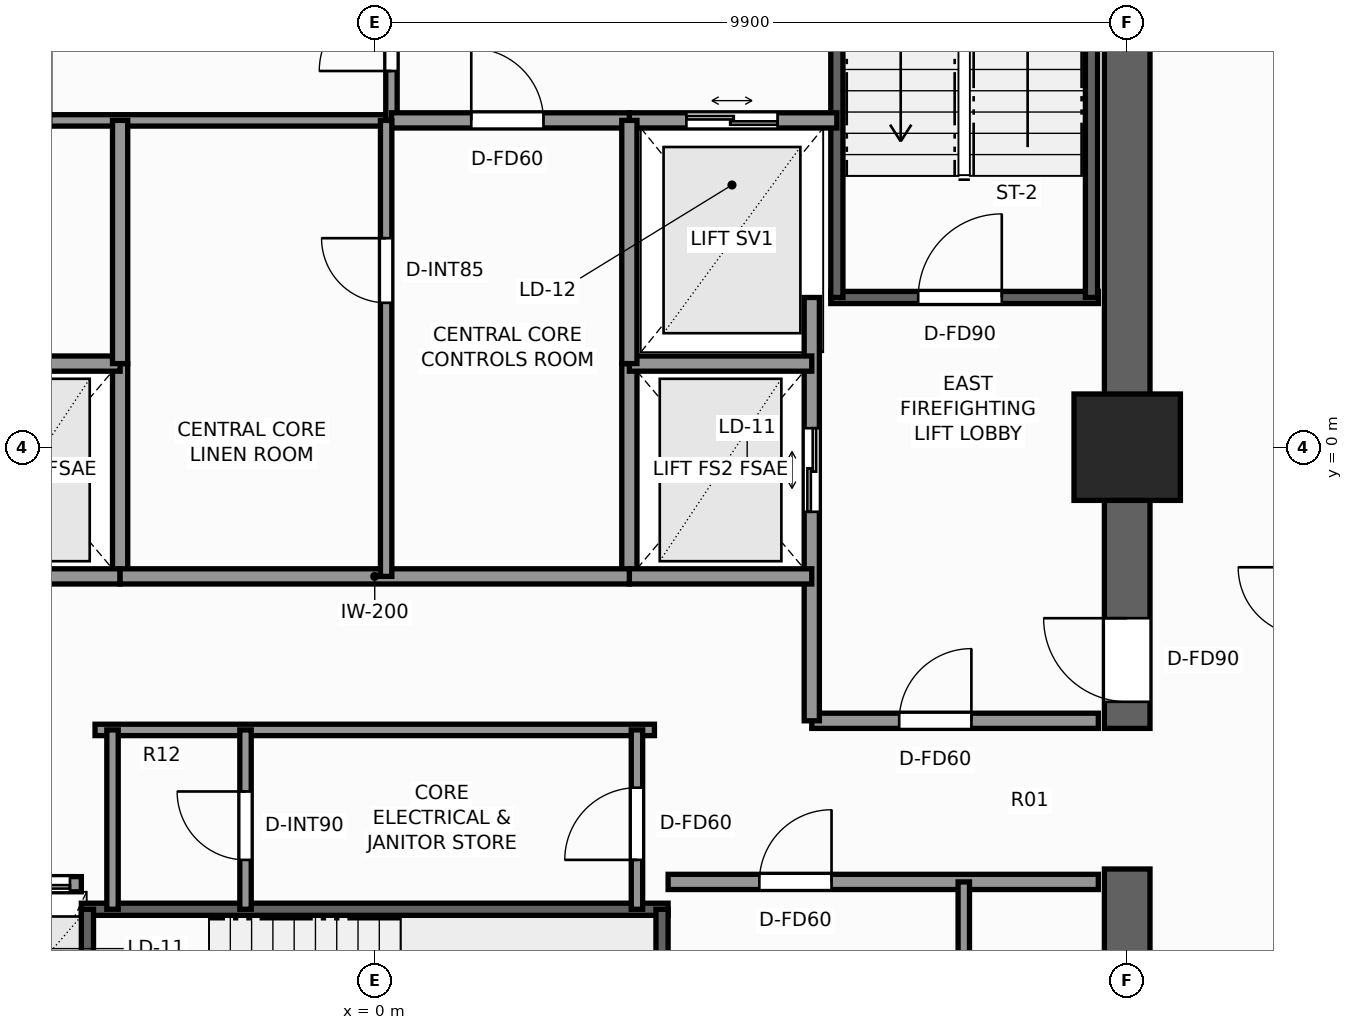
"""IFC4 building model, lengths in metres.
Left out: names, types, materials, properties, quantities, classifications, styles, units other than length and angle.
Written with IfcOpenShell. Run it as: python <this file> out.ifc"""

import sys

from ifc_helpers import new_model, si_unit, direction, frame, frame_2d, origin, origin_2d, place, context, subcontext, project, spatial, rectangle, extrude, element, fill, save


model = new_model("IFC4")
c1 = context("Model", 3, precision=1e-05, world=origin(), true_north=direction((0.0, 1.0)))
c2 = subcontext(c1, "Body", "Model", "MODEL_VIEW")
j1 = project(units=[si_unit("LENGTHUNIT", "METRE"), si_unit("PLANEANGLEUNIT", "RADIAN")], contexts=[c1])
p1 = place(None, origin())
s1 = spatial("IfcSite", under=j1, at=p1, CompositionType="ELEMENT")
p2 = place(p1, origin())
s2 = spatial("IfcBuilding", under=s1, at=p2, CompositionType="ELEMENT")
p3 = place(p2, frame((0.0, 0.0, 101.9)))
s3 = spatial("IfcBuildingStorey", under=s2, at=p3, CompositionType="ELEMENT", Elevation=101.9)
p4 = place(p3, frame((9.9, -9.6, 0.0), z_axis=(0.0, 0.0, 1.0), x_axis=(0.0, 1.0, 0.0)))
e1 = element("IfcWall", 1, at=p4, inside=s3, PredefinedType="SHEAR", context=c2, shape_type="SweptSolid", body=[
    extrude(rectangle(XDim=4.05, YDim=0.6, at=frame_2d((2.025, 0.0))), origin(), (0.0, 0.0, 1.0), 3.3),
])
p5 = place(p3, frame((9.9, -3.7, 0.0), z_axis=(0.0, 0.0, 1.0), x_axis=(0.0, 1.0, 0.0)))
e2 = element("IfcWall", 2, at=p5, inside=s3, PredefinedType="SHEAR", context=c2, shape_type="SweptSolid", body=[
    extrude(rectangle(XDim=13.3, YDim=0.6, at=frame_2d((6.65, 0.0))), origin(), (0.0, 0.0, 1.0), 3.3),
])
p6 = place(p5, frame((0.35, 0.0, 0.0)))
e3 = element("IfcOpeningElement", 3, at=p6, cuts=e2, PredefinedType="OPENING", context=c2, shape_type="SweptSolid", body=[
    extrude(rectangle(XDim=1.1, YDim=2.2, at=frame_2d((0.55, 1.1))), frame((0.0, 0.31, 0.0), z_axis=(0.0, -1.0, 0.0), x_axis=(1.0, 0.0, 0.0)), (0.0, 0.0, 1.0), 0.62),
])
p7 = place(p3, frame((9.9, 0.0, 0.0), z_axis=(0.0, 0.0, 1.0), x_axis=(1.0, 0.0, 0.0)))
e4 = element("IfcColumn", 4, at=p7, inside=s3, PredefinedType="COLUMN", context=c2, shape_type="SweptSolid", body=[
    extrude(rectangle(XDim=1.4, YDim=1.4, at=origin_2d()), origin(), (0.0, 0.0, 1.0), 3.3),
])
p8 = place(p3, frame((6.0, 1.97, 0.0), z_axis=(0.0, 0.0, 1.0), x_axis=(1.0, 0.0, 0.0)))
e5 = element("IfcWall", 5, at=p8, inside=s3, PredefinedType="SHEAR", context=c2, shape_type="SweptSolid", body=[
    extrude(rectangle(XDim=3.52, YDim=0.16, at=frame_2d((1.76, 0.0))), origin(), (0.0, 0.0, 1.0), 3.3),
])
p9 = place(p8, frame((1.15, 0.0, 0.0)))
e6 = element("IfcOpeningElement", 6, at=p9, cuts=e5, PredefinedType="OPENING", context=c2, shape_type="SweptSolid", body=[
    extrude(rectangle(XDim=1.1, YDim=2.2, at=frame_2d((0.55, 1.1))), frame((0.0, 0.09, 0.0), z_axis=(0.0, -1.0, 0.0), x_axis=(1.0, 0.0, 0.0)), (0.0, 0.0, 1.0), 0.18),
])
for number, where, z_axis, x_axis in (
    (7, (6.08, 1.97, 0.0), (0.0, 0.0, 1.0), (0.0, 1.0, 0.0)),
    (8, (9.43, 1.97, 0.0), (0.0, 0.0, 1.0), (0.0, 1.0, 0.0)),
):
    element("IfcWall", number, at=place(p3, frame(where, z_axis=z_axis, x_axis=x_axis)), inside=s3, PredefinedType="SHEAR", context=c2, shape_type="SweptSolid", body=[
        extrude(rectangle(XDim=7.56, YDim=0.16, at=frame_2d((3.78, 0.0))), origin(), (0.0, 0.0, 1.0), 3.3),
    ])
p10 = place(p3, frame((-3.86, -6.08, 0.0), z_axis=(0.0, 0.0, 1.0), x_axis=(1.0, 0.0, 0.0)))
e9 = element("IfcWall", 9, at=p10, inside=s3, PredefinedType="SHEAR", context=c2, shape_type="SweptSolid", body=[
    extrude(rectangle(XDim=7.72, YDim=0.16, at=frame_2d((3.86, 0.0))), origin(), (0.0, 0.0, 1.0), 3.3),
])
for number, where, z_axis, x_axis in (
    (10, (-3.78, -9.43, 0.0), (0.0, 0.0, 1.0), (0.0, 1.0, 0.0)),
    (11, (3.78, -9.43, 0.0), (0.0, 0.0, 1.0), (0.0, 1.0, 0.0)),
):
    element("IfcWall", number, at=place(p3, frame(where, z_axis=z_axis, x_axis=x_axis)), inside=s3, PredefinedType="SHEAR", context=c2, shape_type="SweptSolid", body=[
        extrude(rectangle(XDim=3.35, YDim=0.16, at=frame_2d((1.675, 0.0))), origin(), (0.0, 0.0, 1.0), 3.3),
    ])
p11 = place(p3, frame((-3.35, -1.7, 0.0), z_axis=(0.0, 0.0, 1.0), x_axis=(0.0, 1.0, 0.0)))
e12 = element("IfcWall", 12, at=p11, inside=s3, PredefinedType="SOLIDWALL", context=c2, shape_type="SweptSolid", body=[
    extrude(rectangle(XDim=2.8, YDim=0.2, at=frame_2d((1.4, 0.0))), origin(), (0.0, 0.0, 1.0), 3.08),
])
for number, where, z_axis, x_axis in (
    (13, (-5.75, -1.7, 0.0), (0.0, 0.0, 1.0), (1.0, 0.0, 0.0)),
    (14, (-5.75, 1.1, 0.0), (0.0, 0.0, 1.0), (1.0, 0.0, 0.0)),
):
    element("IfcWall", number, at=place(p3, frame(where, z_axis=z_axis, x_axis=x_axis)), inside=s3, PredefinedType="SOLIDWALL", context=c2, shape_type="SweptSolid", body=[
        extrude(rectangle(XDim=2.4, YDim=0.2, at=frame_2d((1.2, 0.0))), origin(), (0.0, 0.0, 1.0), 3.08),
    ])
p12 = place(p3, frame((5.75, -3.6, 0.0), z_axis=(0.0, 0.0, 1.0), x_axis=(1.0, 0.0, 0.0)))
e15 = element("IfcWall", 15, at=p12, inside=s3, PredefinedType="SOLIDWALL", context=c2, shape_type="SweptSolid", body=[
    extrude(rectangle(XDim=3.77, YDim=0.2, at=frame_2d((1.885, 0.0))), origin(), (0.0, 0.0, 1.0), 3.08),
])
p13 = place(p12, frame((1.15, 0.0, 0.0)))
e16 = element("IfcOpeningElement", 16, at=p13, cuts=e15, PredefinedType="OPENING", context=c2, shape_type="SweptSolid", body=[
    extrude(rectangle(XDim=0.95, YDim=2.06, at=frame_2d((0.475, 1.03))), frame((0.0, 0.11, 0.0), z_axis=(0.0, -1.0, 0.0), x_axis=(1.0, 0.0, 0.0)), (0.0, 0.0, 1.0), 0.22),
])
p14 = place(p3, frame((5.75, -3.6, 0.0), z_axis=(0.0, 0.0, 1.0), x_axis=(0.0, 1.0, 0.0)))
e17 = element("IfcWall", 17, at=p14, inside=s3, PredefinedType="SOLIDWALL", context=c2, shape_type="SweptSolid", body=[
    extrude(rectangle(XDim=5.57, YDim=0.2, at=frame_2d((2.785, 0.0))), origin(), (0.0, 0.0, 1.0), 3.08),
])
p15 = place(p14, frame((2.75, 0.0, 0.0)))
e18 = element("IfcOpeningElement", 18, at=p15, cuts=e17, PredefinedType="OPENING", context=c2, shape_type="SweptSolid", body=[
    extrude(rectangle(XDim=1.1, YDim=2.2, at=frame_2d((0.55, 1.1))), frame((0.0, 0.11, 0.0), z_axis=(0.0, -1.0, 0.0), x_axis=(1.0, 0.0, 0.0)), (0.0, 0.0, 1.0), 0.22),
])
p16 = place(p3, frame((3.35, -1.7, 0.0), z_axis=(0.0, 0.0, 1.0), x_axis=(0.0, 1.0, 0.0)))
e19 = element("IfcWall", 19, at=p16, inside=s3, PredefinedType="SOLIDWALL", context=c2, shape_type="SweptSolid", body=[
    extrude(rectangle(XDim=2.8, YDim=0.2, at=frame_2d((1.4, 0.0))), origin(), (0.0, 0.0, 1.0), 3.08),
])
for number, where, z_axis, x_axis in (
    (20, (3.35, -1.7, 0.0), (0.0, 0.0, 1.0), (1.0, 0.0, 0.0)),
    (21, (3.35, 1.1, 0.0), (0.0, 0.0, 1.0), (1.0, 0.0, 0.0)),
):
    element("IfcWall", number, at=place(p3, frame(where, z_axis=z_axis, x_axis=x_axis)), inside=s3, PredefinedType="SOLIDWALL", context=c2, shape_type="SweptSolid", body=[
        extrude(rectangle(XDim=2.4, YDim=0.2, at=frame_2d((1.2, 0.0))), origin(), (0.0, 0.0, 1.0), 3.08),
    ])
p17 = place(p3, frame((3.35, 4.3, 0.0), z_axis=(0.0, 0.0, 1.0), x_axis=(1.0, 0.0, 0.0)))
e22 = element("IfcWall", 22, at=p17, inside=s3, PredefinedType="SOLIDWALL", context=c2, shape_type="SweptSolid", body=[
    extrude(rectangle(XDim=2.73, YDim=0.2, at=frame_2d((1.365, 0.0))), origin(), (0.0, 0.0, 1.0), 3.08),
])
p18 = place(p17, frame((0.75, 0.0, 0.0)))
e23 = element("IfcOpeningElement", 23, at=p18, cuts=e22, PredefinedType="OPENING", context=c2, shape_type="SweptSolid", body=[
    extrude(rectangle(XDim=1.2, YDim=2.25, at=frame_2d((0.6, 1.125))), frame((0.0, 0.11, 0.0), z_axis=(0.0, -1.0, 0.0), x_axis=(1.0, 0.0, 0.0)), (0.0, 0.0, 1.0), 0.22),
])
p19 = place(p3, frame((-6.08, 4.3, 0.0), z_axis=(0.0, 0.0, 1.0), x_axis=(1.0, 0.0, 0.0)))
e24 = element("IfcWall", 24, at=p19, inside=s3, PredefinedType="PARTITIONING", context=c2, shape_type="SweptSolid", body=[
    extrude(rectangle(XDim=6.3, YDim=0.15, at=frame_2d((3.15, 0.0))), origin(), (0.0, 0.0, 1.0), 3.08),
])
p20 = place(p19, frame((0.65, 0.0, 0.0)))
e25 = element("IfcOpeningElement", 25, at=p20, cuts=e24, PredefinedType="OPENING", context=c2, shape_type="SweptSolid", body=[
    extrude(rectangle(XDim=0.85, YDim=2.03, at=frame_2d((0.425, 1.015))), frame((0.0, 0.085, 0.0), z_axis=(0.0, -1.0, 0.0), x_axis=(1.0, 0.0, 0.0)), (0.0, 0.0, 1.0), 0.17),
])
p21 = place(p3, frame((0.22, 4.3, 0.0), z_axis=(0.0, 0.0, 1.0), x_axis=(0.0, 1.0, 0.0)))
e26 = element("IfcWall", 26, at=p21, inside=s3, PredefinedType="PARTITIONING", context=c2, shape_type="SweptSolid", body=[
    extrude(rectangle(XDim=5.22, YDim=0.15, at=frame_2d((2.61, 0.0))), origin(), (0.0, 0.0, 1.0), 3.08),
])
p22 = place(p21, frame((0.65, 0.0, 0.0)))
e27 = element("IfcOpeningElement", 27, at=p22, cuts=e26, PredefinedType="OPENING", context=c2, shape_type="SweptSolid", body=[
    extrude(rectangle(XDim=0.95, YDim=2.06, at=frame_2d((0.475, 1.03))), frame((0.0, 0.085, 0.0), z_axis=(0.0, -1.0, 0.0), x_axis=(1.0, 0.0, 0.0)), (0.0, 0.0, 1.0), 0.17),
])
p23 = place(p3, frame((-9.52, -5.75, 0.0), z_axis=(0.0, 0.0, 1.0), x_axis=(1.0, 0.0, 0.0)))
e28 = element("IfcWall", 28, at=p23, inside=s3, PredefinedType="SOLIDWALL", context=c2, shape_type="SweptSolid", body=[
    extrude(rectangle(XDim=5.66, YDim=0.2, at=frame_2d((2.83, 0.0))), origin(), (0.0, 0.0, 1.0), 3.08),
])
p24 = place(p23, frame((0.55, 0.0, 0.0)))
e29 = element("IfcOpeningElement", 29, at=p24, cuts=e28, PredefinedType="OPENING", context=c2, shape_type="SweptSolid", body=[
    extrude(rectangle(XDim=1.1, YDim=2.2, at=frame_2d((0.55, 1.1))), frame((0.0, 0.11, 0.0), z_axis=(0.0, -1.0, 0.0), x_axis=(1.0, 0.0, 0.0)), (0.0, 0.0, 1.0), 0.22),
])
p25 = place(p23, frame((2.48, 0.0, 0.0)))
e30 = element("IfcOpeningElement", 30, at=p25, cuts=e28, PredefinedType="OPENING", context=c2, shape_type="SweptSolid", body=[
    extrude(rectangle(XDim=1.1, YDim=2.2, at=frame_2d((0.55, 1.1))), frame((0.0, 0.11, 0.0), z_axis=(0.0, -1.0, 0.0), x_axis=(1.0, 0.0, 0.0)), (0.0, 0.0, 1.0), 0.22),
])
p26 = place(p23, frame((4.41, 0.0, 0.0)))
e31 = element("IfcOpeningElement", 31, at=p26, cuts=e28, PredefinedType="OPENING", context=c2, shape_type="SweptSolid", body=[
    extrude(rectangle(XDim=1.1, YDim=2.2, at=frame_2d((0.55, 1.1))), frame((0.0, 0.11, 0.0), z_axis=(0.0, -1.0, 0.0), x_axis=(1.0, 0.0, 0.0)), (0.0, 0.0, 1.0), 0.22),
])
p27 = place(p3, frame((3.86, -5.72, 0.0), z_axis=(0.0, 0.0, 1.0), x_axis=(1.0, 0.0, 0.0)))
e32 = element("IfcWall", 32, at=p27, inside=s3, PredefinedType="SOLIDWALL", context=c2, shape_type="SweptSolid", body=[
    extrude(rectangle(XDim=5.66, YDim=0.2, at=frame_2d((2.83, 0.0))), origin(), (0.0, 0.0, 1.0), 3.08),
])
p28 = place(p27, frame((1.2, 0.0, 0.0)))
e33 = element("IfcOpeningElement", 33, at=p28, cuts=e32, PredefinedType="OPENING", context=c2, shape_type="SweptSolid", body=[
    extrude(rectangle(XDim=0.95, YDim=2.06, at=frame_2d((0.475, 1.03))), frame((0.0, 0.11, 0.0), z_axis=(0.0, -1.0, 0.0), x_axis=(1.0, 0.0, 0.0)), (0.0, 0.0, 1.0), 0.22),
])
p29 = place(p3, frame((7.75, -9.52, 0.0), z_axis=(0.0, 0.0, 1.0), x_axis=(0.0, 1.0, 0.0)))
e34 = element("IfcWall", 34, at=p29, inside=s3, PredefinedType="PARTITIONING", context=c2, shape_type="SweptSolid", body=[
    extrude(rectangle(XDim=3.8, YDim=0.15, at=frame_2d((1.9, 0.0))), origin(), (0.0, 0.0, 1.0), 3.08),
])
p30 = place(p29, frame((0.9, 0.0, 0.0)))
e35 = element("IfcOpeningElement", 35, at=p30, cuts=e34, PredefinedType="OPENING", context=c2, shape_type="SweptSolid", body=[
    extrude(rectangle(XDim=0.85, YDim=2.03, at=frame_2d((0.425, 1.015))), frame((0.0, 0.085, 0.0), z_axis=(0.0, -1.0, 0.0), x_axis=(1.0, 0.0, 0.0)), (0.0, 0.0, 1.0), 0.17),
])
p31 = place(p3, frame((0.22, 4.3, 0.0), z_axis=(0.0, 0.0, 1.0), x_axis=(1.0, 0.0, 0.0)))
e36 = element("IfcWall", 36, at=p31, inside=s3, PredefinedType="SOLIDWALL", context=c2, shape_type="SweptSolid", body=[
    extrude(rectangle(XDim=3.13, YDim=0.2, at=frame_2d((1.565, 0.0))), origin(), (0.0, 0.0, 1.0), 3.08),
])
p32 = place(p31, frame((1.05, 0.0, 0.0)))
e37 = element("IfcOpeningElement", 37, at=p32, cuts=e36, PredefinedType="OPENING", context=c2, shape_type="SweptSolid", body=[
    extrude(rectangle(XDim=0.95, YDim=2.06, at=frame_2d((0.475, 1.03))), frame((0.0, 0.11, 0.0), z_axis=(0.0, -1.0, 0.0), x_axis=(1.0, 0.0, 0.0)), (0.0, 0.0, 1.0), 0.22),
])
p33 = place(p3, frame((-3.35, -1.7, 0.0), z_axis=(0.0, 0.0, 1.0), x_axis=(1.0, 0.0, 0.0)))
e38 = element("IfcWall", 38, at=p33, inside=s3, PredefinedType="SOLIDWALL", context=c2, shape_type="SweptSolid", body=[
    extrude(rectangle(XDim=6.7, YDim=0.2, at=frame_2d((3.35, 0.0))), origin(), (0.0, 0.0, 1.0), 3.08),
])
for number, where, z_axis, x_axis in (
    (39, (-3.35, 1.1, 0.0), (0.0, 0.0, 1.0), (0.0, 1.0, 0.0)),
    (40, (3.35, 1.1, 0.0), (0.0, 0.0, 1.0), (0.0, 1.0, 0.0)),
):
    element("IfcWall", number, at=place(p3, frame(where, z_axis=z_axis, x_axis=x_axis)), inside=s3, PredefinedType="SOLIDWALL", context=c2, shape_type="SweptSolid", body=[
        extrude(rectangle(XDim=3.2, YDim=0.2, at=frame_2d((1.6, 0.0))), origin(), (0.0, 0.0, 1.0), 3.08),
    ])
p34 = place(p3, frame((0.15, -1.7, 0.0), z_axis=(0.0, 0.0, 1.0), x_axis=(0.0, 1.0, 0.0)))
e41 = element("IfcWall", 41, at=p34, inside=s3, PredefinedType="PARTITIONING", context=c2, shape_type="SweptSolid", body=[
    extrude(rectangle(XDim=6.0, YDim=0.15, at=frame_2d((3.0, 0.0))), origin(), (0.0, 0.0, 1.0), 3.08),
])
p35 = place(p34, frame((3.6, 0.0, 0.0)))
e42 = element("IfcOpeningElement", 42, at=p35, cuts=e41, PredefinedType="OPENING", context=c2, shape_type="SweptSolid", body=[
    extrude(rectangle(XDim=0.85, YDim=2.03, at=frame_2d((0.425, 1.015))), frame((0.0, 0.085, 0.0), z_axis=(0.0, -1.0, 0.0), x_axis=(1.0, 0.0, 0.0)), (0.0, 0.0, 1.0), 0.17),
])
p36 = place(p3, frame((-3.68, -3.72, 0.0), z_axis=(0.0, 0.0, 1.0), x_axis=(1.0, 0.0, 0.0)))
e43 = element("IfcWall", 43, at=p36, inside=s3, PredefinedType="PARTITIONING", context=c2, shape_type="SweptSolid", body=[
    extrude(rectangle(XDim=7.36, YDim=0.15, at=frame_2d((3.68, 0.0))), origin(), (0.0, 0.0, 1.0), 3.08),
])
p37 = place(p3, frame((3.45, -6.08, 0.0), z_axis=(0.0, 0.0, 1.0), x_axis=(0.0, 1.0, 0.0)))
e44 = element("IfcWall", 44, at=p37, inside=s3, PredefinedType="PARTITIONING", context=c2, shape_type="SweptSolid", body=[
    extrude(rectangle(XDim=2.36, YDim=0.15, at=frame_2d((1.18, 0.0))), origin(), (0.0, 0.0, 1.0), 3.08),
])
p38 = place(p37, frame((0.65, 0.0, 0.0)))
e45 = element("IfcOpeningElement", 45, at=p38, cuts=e44, PredefinedType="OPENING", context=c2, shape_type="SweptSolid", body=[
    extrude(rectangle(XDim=0.95, YDim=2.06, at=frame_2d((0.475, 1.03))), frame((0.0, 0.085, 0.0), z_axis=(0.0, -1.0, 0.0), x_axis=(1.0, 0.0, 0.0)), (0.0, 0.0, 1.0), 0.17),
])
p39 = place(p3, frame((-3.45, -6.08, 0.0), z_axis=(0.0, 0.0, 1.0), x_axis=(0.0, 1.0, 0.0)))
e46 = element("IfcWall", 46, at=p39, inside=s3, PredefinedType="PARTITIONING", context=c2, shape_type="SweptSolid", body=[
    extrude(rectangle(XDim=2.36, YDim=0.15, at=frame_2d((1.18, 0.0))), origin(), (0.0, 0.0, 1.0), 3.08),
])
p40 = place(p3, frame((-1.7, -6.08, 0.0), z_axis=(0.0, 0.0, 1.0), x_axis=(0.0, 1.0, 0.0)))
e47 = element("IfcWall", 47, at=p40, inside=s3, PredefinedType="PARTITIONING", context=c2, shape_type="SweptSolid", body=[
    extrude(rectangle(XDim=2.36, YDim=0.15, at=frame_2d((1.18, 0.0))), origin(), (0.0, 0.0, 1.0), 3.08),
])
p41 = place(p40, frame((0.65, 0.0, 0.0)))
e48 = element("IfcOpeningElement", 48, at=p41, cuts=e47, PredefinedType="OPENING", context=c2, shape_type="SweptSolid", body=[
    extrude(rectangle(XDim=0.9, YDim=2.06, at=frame_2d((0.45, 1.03))), frame((0.0, 0.085, 0.0), z_axis=(0.0, -1.0, 0.0), x_axis=(1.0, 0.0, 0.0)), (0.0, 0.0, 1.0), 0.17),
])
p42 = place(p9, origin())
e49 = element("IfcDoor", 49, at=p42, inside=s3, OperationType="SINGLE_SWING_RIGHT", PredefinedType="DOOR", context=c2, shape_type="SweptSolid", body=[
    extrude(rectangle(XDim=1.1, YDim=2.2, at=frame_2d((0.55, 1.1))), frame((0.0, 0.025, 0.0), z_axis=(0.0, -1.0, 0.0), x_axis=(1.0, 0.0, 0.0)), (0.0, 0.0, 1.0), 0.05),
])
fill(e6, e49)
p43 = place(p6, origin())
e50 = element("IfcDoor", 50, at=p43, inside=s3, OperationType="SINGLE_SWING_RIGHT", PredefinedType="DOOR", context=c2, shape_type="SweptSolid", body=[
    extrude(rectangle(XDim=1.1, YDim=2.2, at=frame_2d((0.55, 1.1))), frame((0.0, 0.025, 0.0), z_axis=(0.0, -1.0, 0.0), x_axis=(1.0, 0.0, 0.0)), (0.0, 0.0, 1.0), 0.05),
])
fill(e3, e50)
p44 = place(p15, origin())
e51 = element("IfcDoor", 51, at=p44, inside=s3, OperationType="DOUBLE_DOOR_SLIDING", PredefinedType="DOOR", context=c2, shape_type="SweptSolid", body=[
    extrude(rectangle(XDim=1.1, YDim=2.2, at=frame_2d((0.55, 1.1))), frame((0.0, 0.025, 0.0), z_axis=(0.0, -1.0, 0.0), x_axis=(1.0, 0.0, 0.0)), (0.0, 0.0, 1.0), 0.05),
])
fill(e18, e51)
p45 = place(p18, origin())
e52 = element("IfcDoor", 52, at=p45, inside=s3, OperationType="DOUBLE_DOOR_SLIDING", PredefinedType="DOOR", context=c2, shape_type="SweptSolid", body=[
    extrude(rectangle(XDim=1.2, YDim=2.25, at=frame_2d((0.6, 1.125))), frame((0.0, 0.025, 0.0), z_axis=(0.0, -1.0, 0.0), x_axis=(1.0, 0.0, 0.0)), (0.0, 0.0, 1.0), 0.05),
])
fill(e23, e52)
p46 = place(p22, origin())
e53 = element("IfcDoor", 53, at=p46, inside=s3, OperationType="SINGLE_SWING_LEFT", PredefinedType="DOOR", context=c2, shape_type="SweptSolid", body=[
    extrude(rectangle(XDim=0.95, YDim=2.06, at=frame_2d((0.475, 1.03))), frame((0.0, 0.025, 0.0), z_axis=(0.0, -1.0, 0.0), x_axis=(1.0, 0.0, 0.0)), (0.0, 0.0, 1.0), 0.05),
])
fill(e27, e53)
p47 = place(p26, origin())
e54 = element("IfcDoor", 54, at=p47, inside=s3, OperationType="DOUBLE_DOOR_SLIDING", PredefinedType="DOOR", context=c2, shape_type="SweptSolid", body=[
    extrude(rectangle(XDim=1.1, YDim=2.2, at=frame_2d((0.55, 1.1))), frame((0.0, 0.025, 0.0), z_axis=(0.0, -1.0, 0.0), x_axis=(1.0, 0.0, 0.0)), (0.0, 0.0, 1.0), 0.05),
])
fill(e31, e54)
p48 = place(p28, origin())
e55 = element("IfcDoor", 55, at=p48, inside=s3, OperationType="SINGLE_SWING_RIGHT", PredefinedType="DOOR", context=c2, shape_type="SweptSolid", body=[
    extrude(rectangle(XDim=0.95, YDim=2.06, at=frame_2d((0.475, 1.03))), frame((0.0, 0.025, 0.0), z_axis=(0.0, -1.0, 0.0), x_axis=(1.0, 0.0, 0.0)), (0.0, 0.0, 1.0), 0.05),
])
fill(e33, e55)
p49 = place(p13, origin())
e56 = element("IfcDoor", 56, at=p49, inside=s3, OperationType="SINGLE_SWING_RIGHT", PredefinedType="DOOR", context=c2, shape_type="SweptSolid", body=[
    extrude(rectangle(XDim=0.95, YDim=2.06, at=frame_2d((0.475, 1.03))), frame((0.0, 0.025, 0.0), z_axis=(0.0, -1.0, 0.0), x_axis=(1.0, 0.0, 0.0)), (0.0, 0.0, 1.0), 0.05),
])
fill(e16, e56)
p50 = place(p32, origin())
e57 = element("IfcDoor", 57, at=p50, inside=s3, OperationType="SINGLE_SWING_LEFT", PredefinedType="DOOR", context=c2, shape_type="SweptSolid", body=[
    extrude(rectangle(XDim=0.95, YDim=2.06, at=frame_2d((0.475, 1.03))), frame((0.0, 0.025, 0.0), z_axis=(0.0, -1.0, 0.0), x_axis=(1.0, 0.0, 0.0)), (0.0, 0.0, 1.0), 0.05),
])
fill(e37, e57)
p51 = place(p35, origin())
e58 = element("IfcDoor", 58, at=p51, inside=s3, OperationType="SINGLE_SWING_RIGHT", PredefinedType="DOOR", context=c2, shape_type="SweptSolid", body=[
    extrude(rectangle(XDim=0.85, YDim=2.03, at=frame_2d((0.425, 1.015))), frame((0.0, 0.025, 0.0), z_axis=(0.0, -1.0, 0.0), x_axis=(1.0, 0.0, 0.0)), (0.0, 0.0, 1.0), 0.05),
])
fill(e42, e58)
p52 = place(p38, origin())
e59 = element("IfcDoor", 59, at=p52, inside=s3, OperationType="SINGLE_SWING_LEFT", PredefinedType="DOOR", context=c2, shape_type="SweptSolid", body=[
    extrude(rectangle(XDim=0.95, YDim=2.06, at=frame_2d((0.475, 1.03))), frame((0.0, 0.025, 0.0), z_axis=(0.0, -1.0, 0.0), x_axis=(1.0, 0.0, 0.0)), (0.0, 0.0, 1.0), 0.05),
])
fill(e45, e59)
p53 = place(p41, origin())
e60 = element("IfcDoor", 60, at=p53, inside=s3, OperationType="SINGLE_SWING_RIGHT", PredefinedType="DOOR", context=c2, shape_type="SweptSolid", body=[
    extrude(rectangle(XDim=0.9, YDim=2.06, at=frame_2d((0.45, 1.03))), frame((0.0, 0.025, 0.0), z_axis=(0.0, -1.0, 0.0), x_axis=(1.0, 0.0, 0.0)), (0.0, 0.0, 1.0), 0.05),
])
fill(e48, e60)
save(model, sys.argv[1])
